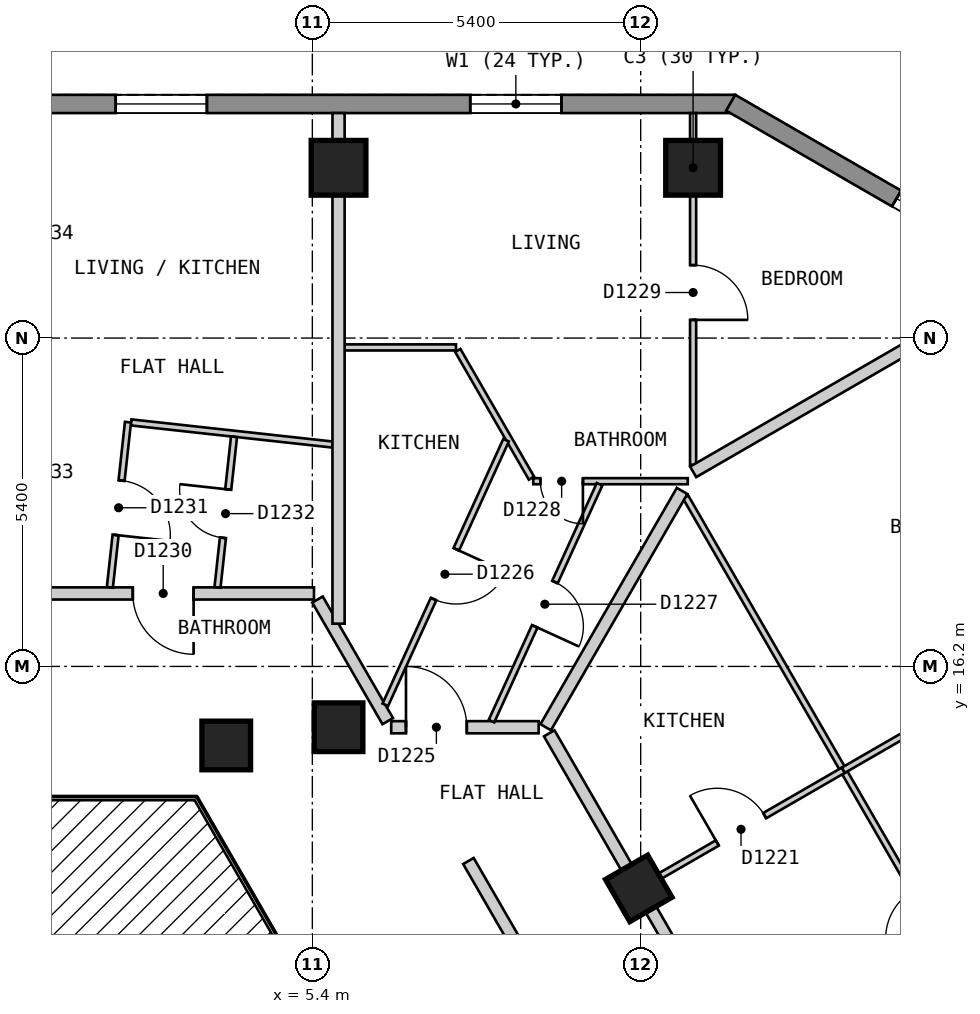
"""IFC4 building model, lengths in metres.
Left out: names, types, materials, properties, quantities, classifications, styles, units other than length and angle.
Written with IfcOpenShell. Run it as: python <this file> out.ifc"""

import sys

from ifc_helpers import new_model, si_unit, direction, frame, frame_2d, origin, origin_2d, place, context, subcontext, project, spatial, polyline, rectangle, outline, extrude, element, fill, save


model = new_model("IFC4")
c1 = context("Model", 3, precision=1e-05, world=origin(), true_north=direction((0.0, 1.0)))
c2 = subcontext(c1, "Body", "Model", "MODEL_VIEW")
j1 = project(units=[si_unit("LENGTHUNIT", "METRE"), si_unit("PLANEANGLEUNIT", "RADIAN")], contexts=[c1])
p1 = place(None, origin())
s1 = spatial("IfcSite", under=j1, at=p1, CompositionType="ELEMENT")
p2 = place(p1, origin())
s2 = spatial("IfcBuilding", under=s1, at=p2, CompositionType="ELEMENT")
p3 = place(p2, frame((0.0, 0.0, 117.6)))
s3 = spatial("IfcBuildingStorey", under=s2, at=p3, CompositionType="ELEMENT", Elevation=117.6)
for number, where, z_axis, x_axis in (
    (1, (11.662, 24.4, 0.0), (0.0, 0.0, 1.0), (-1.0, 0.0, 0.0)),
    (2, (5.831, 24.4, 0.0), (0.0, 0.0, 1.0), (-1.0, 0.0, 0.0)),
):
    element("IfcColumn", number, at=place(p3, frame(where, z_axis=z_axis, x_axis=x_axis)), inside=s3, PredefinedType="COLUMN", context=c2, shape_type="SweptSolid", body=[
        extrude(rectangle(XDim=0.9, YDim=0.9, at=origin_2d()), origin(), (0.0, 0.0, 1.0), 3.0),
    ])
for number, where, z_axis, x_axis in (
    (3, (10.768, 12.55, 0.0), (0.0, 0.0, 1.0), (-0.5, 0.866, 0.0)),
    (4, (5.831, 15.2, 0.0), (0.0, 0.0, 1.0), (-1.0, 0.0, 0.0)),
    (5, (3.984, 14.9, 0.0), (0.0, 0.0, 1.0), (1.0, 0.0, 0.0)),
):
    element("IfcColumn", number, at=place(p3, frame(where, z_axis=z_axis, x_axis=x_axis)), inside=s3, PredefinedType="COLUMN", context=c2, shape_type="SweptSolid", body=[
        extrude(rectangle(XDim=0.8, YDim=0.8, at=origin_2d()), origin(), (0.0, 0.0, 1.0), 3.0),
    ])
p4 = place(p3, frame((12.355, 25.45, 0.0), z_axis=(0.0, 0.0, 1.0), x_axis=(-1.0, 0.0, 0.0)))
e6 = element("IfcWall", 6, at=p4, inside=s3, PredefinedType="SOLIDWALL", context=c2, shape_type="SweptSolid", body=[
    extrude(outline(polyline([(0.0, -0.15), (24.71, -0.15), (24.63, 0.15), (0.08, 0.15), (0.0, -0.15)])), origin(), (0.0, 0.0, 1.0), 2.7),
])
p5 = place(p4, frame((2.858, 0.0, 0.15)))
e7 = element("IfcOpeningElement", 7, at=p5, cuts=e6, PredefinedType="OPENING", context=c2, shape_type="SweptSolid", body=[
    extrude(rectangle(XDim=1.5, YDim=2.1, at=frame_2d((0.75, 1.05))), frame((0.0, 0.16, 0.0), z_axis=(0.0, -1.0, 0.0), x_axis=(1.0, 0.0, 0.0)), (0.0, 0.0, 1.0), 0.32),
])
p6 = place(p4, frame((8.689, 0.0, 0.15)))
e8 = element("IfcOpeningElement", 8, at=p6, cuts=e6, PredefinedType="OPENING", context=c2, shape_type="SweptSolid", body=[
    extrude(rectangle(XDim=1.5, YDim=2.1, at=frame_2d((0.75, 1.05))), frame((0.0, 0.16, 0.0), z_axis=(0.0, -1.0, 0.0), x_axis=(1.0, 0.0, 0.0)), (0.0, 0.0, 1.0), 0.32),
])
p7 = place(p4, frame((14.521, 0.0, 0.15)))
e9 = element("IfcOpeningElement", 9, at=p7, cuts=e6, PredefinedType="OPENING", context=c2, shape_type="SweptSolid", body=[
    extrude(rectangle(XDim=1.5, YDim=2.1, at=frame_2d((0.75, 1.05))), frame((0.0, 0.16, 0.0), z_axis=(0.0, -1.0, 0.0), x_axis=(1.0, 0.0, 0.0)), (0.0, 0.0, 1.0), 0.32),
])
p8 = place(p4, frame((20.352, 0.0, 0.15)))
e10 = element("IfcOpeningElement", 10, at=p8, cuts=e6, PredefinedType="OPENING", context=c2, shape_type="SweptSolid", body=[
    extrude(rectangle(XDim=1.5, YDim=2.1, at=frame_2d((0.75, 1.05))), frame((0.0, 0.16, 0.0), z_axis=(0.0, -1.0, 0.0), x_axis=(1.0, 0.0, 0.0)), (0.0, 0.0, 1.0), 0.32),
])
p9 = place(p3, frame((16.61, 22.97, 0.0), z_axis=(0.0, 0.0, 1.0), x_axis=(-0.866022959057, 0.500004234368, 0.0)))
e11 = element("IfcWall", 11, at=p9, inside=s3, PredefinedType="SOLIDWALL", context=c2, shape_type="SweptSolid", body=[
    extrude(outline(polyline([(0.0, -0.15), (5.0, -0.15), (4.92, 0.15), (0.08, 0.15), (0.0, -0.15)])), origin(), (0.0, 0.0, 1.0), 2.7),
])
p10 = place(p9, frame((0.65, 0.0, 0.15)))
e12 = element("IfcOpeningElement", 12, at=p10, cuts=e11, PredefinedType="OPENING", context=c2, shape_type="SweptSolid", body=[
    extrude(rectangle(XDim=1.2, YDim=2.1, at=frame_2d((0.6, 1.05))), frame((0.0, 0.16, 0.0), z_axis=(0.0, -1.0, 0.0), x_axis=(1.0, 0.0, 0.0)), (0.0, 0.0, 1.0), 0.32),
])
p11 = place(p3, frame((5.485, 17.3, 0.0), z_axis=(0.0, 0.0, 1.0), x_axis=(0.500027479704, -0.866009537788, 0.0)))
e13 = element("IfcWall", 13, at=p11, inside=s3, PredefinedType="PARTITIONING", context=c2, shape_type="SweptSolid", body=[
    extrude(rectangle(XDim=2.309, YDim=0.2, at=frame_2d((1.155, 0.0))), origin(), (0.0, 0.0, 1.0), 2.7),
])
p12 = place(p3, frame((7.967, 13.0, 0.0), z_axis=(0.0, 0.0, 1.0), x_axis=(0.50003774998, -0.866003607726, 0.0)))
e14 = element("IfcWall", 14, at=p12, inside=s3, PredefinedType="PARTITIONING", context=c2, shape_type="SweptSolid", body=[
    extrude(rectangle(XDim=14.433, YDim=0.2, at=frame_2d((7.217, 0.0))), origin(), (0.0, 0.0, 1.0), 2.7),
])
p13 = place(p12, frame((6.824, 0.0, 0.0)))
e15 = element("IfcOpeningElement", 15, at=p13, cuts=e14, PredefinedType="OPENING", context=c2, shape_type="SweptSolid", body=[
    extrude(rectangle(XDim=0.9, YDim=2.1, at=frame_2d((0.45, 1.05))), frame((0.0, 0.11, 0.0), z_axis=(0.0, -1.0, 0.0), x_axis=(1.0, 0.0, 0.0)), (0.0, 0.0, 1.0), 0.22),
])
p14 = place(p3, frame((9.296, 15.1, 0.0), z_axis=(0.0, 0.0, 1.0), x_axis=(0.499974024244, -0.866040400375, 0.0)))
e16 = element("IfcWall", 16, at=p14, inside=s3, PredefinedType="PARTITIONING", context=c2, shape_type="SweptSolid", body=[
    extrude(rectangle(XDim=16.857, YDim=0.2, at=frame_2d((8.429, 0.0))), origin(), (0.0, 0.0, 1.0), 2.7),
])
p15 = place(p14, frame((5.187, 0.0, 0.0)))
e17 = element("IfcOpeningElement", 17, at=p15, cuts=e16, PredefinedType="OPENING", context=c2, shape_type="SweptSolid", body=[
    extrude(rectangle(XDim=1.0, YDim=2.1, at=frame_2d((0.5, 1.05))), frame((0.0, 0.11, 0.0), z_axis=(0.0, -1.0, 0.0), x_axis=(1.0, 0.0, 0.0)), (0.0, 0.0, 1.0), 0.22),
])
p16 = place(p3, frame((6.697, 15.2, 0.0), z_axis=(0.0, 0.0, 1.0), x_axis=(1.0, 0.0, 0.0)))
e18 = element("IfcWall", 18, at=p16, inside=s3, PredefinedType="PARTITIONING", context=c2, shape_type="SweptSolid", body=[
    extrude(rectangle(XDim=2.425, YDim=0.2, at=frame_2d((1.212, 0.0))), origin(), (0.0, 0.0, 1.0), 2.7),
])
p17 = place(p16, frame((0.243, 0.0, 0.0)))
e19 = element("IfcOpeningElement", 19, at=p17, cuts=e18, PredefinedType="OPENING", context=c2, shape_type="SweptSolid", body=[
    extrude(rectangle(XDim=1.0, YDim=2.1, at=frame_2d((0.5, 1.05))), frame((0.0, 0.11, 0.0), z_axis=(0.0, -1.0, 0.0), x_axis=(1.0, 0.0, 0.0)), (0.0, 0.0, 1.0), 0.22),
])
p18 = place(p3, frame((-5.311, 17.4, 0.0), z_axis=(0.0, 0.0, 1.0), x_axis=(1.0, 0.0, 0.0)))
e20 = element("IfcWall", 20, at=p18, inside=s3, PredefinedType="PARTITIONING", context=c2, shape_type="SweptSolid", body=[
    extrude(rectangle(XDim=10.738, YDim=0.2, at=frame_2d((5.369, 0.0))), origin(), (0.0, 0.0, 1.0), 2.7),
])
p19 = place(p18, frame((7.758, 0.0, 0.0)))
e21 = element("IfcOpeningElement", 21, at=p19, cuts=e20, PredefinedType="OPENING", context=c2, shape_type="SweptSolid", body=[
    extrude(rectangle(XDim=1.0, YDim=2.1, at=frame_2d((0.5, 1.05))), frame((0.0, 0.11, 0.0), z_axis=(0.0, -1.0, 0.0), x_axis=(1.0, 0.0, 0.0)), (0.0, 0.0, 1.0), 0.22),
])
p20 = place(p3, frame((7.792, 21.396, 0.0), z_axis=(0.0, 0.0, 1.0), x_axis=(0.499821239653, -0.866128586522, 0.0)))
e22 = element("IfcWall", 22, at=p20, inside=s3, PredefinedType="PARTITIONING", context=c2, shape_type="SweptSolid", body=[
    extrude(rectangle(XDim=2.425, YDim=0.1, at=frame_2d((1.212, 0.0))), origin(), (0.0, 0.0, 1.0), 2.7),
])
p21 = place(p3, frame((11.539, 18.986, 0.0), z_axis=(0.0, 0.0, 1.0), x_axis=(0.500019453803, -0.866014171835, 0.0)))
e23 = element("IfcWall", 23, at=p21, inside=s3, PredefinedType="PARTITIONING", context=c2, shape_type="SweptSolid", body=[
    extrude(rectangle(XDim=16.057, YDim=0.1, at=frame_2d((8.029, 0.0))), origin(), (0.0, 0.0, 1.0), 2.7),
])
p22 = place(p21, frame((7.48, 0.0, 0.0)))
e24 = element("IfcOpeningElement", 24, at=p22, cuts=e23, PredefinedType="OPENING", context=c2, shape_type="SweptSolid", body=[
    extrude(rectangle(XDim=0.9, YDim=2.1, at=frame_2d((0.45, 1.05))), frame((0.0, 0.06, 0.0), z_axis=(0.0, -1.0, 0.0), x_axis=(1.0, 0.0, 0.0)), (0.0, 0.0, 1.0), 0.12),
])
p23 = place(p3, frame((2.419, 20.213, 0.0), z_axis=(0.0, 0.0, 1.0), x_axis=(0.994022340378, -0.109176860325, 0.0)))
e25 = element("IfcWall", 25, at=p23, inside=s3, PredefinedType="PARTITIONING", context=c2, shape_type="SweptSolid", body=[
    extrude(rectangle(XDim=3.332, YDim=0.1, at=frame_2d((1.666, 0.0))), origin(), (0.0, 0.0, 1.0), 2.7),
])
p24 = place(p3, frame((9.033, 19.246, 0.0), z_axis=(0.0, 0.0, 1.0), x_axis=(1.0, 0.0, 0.0)))
e26 = element("IfcWall", 26, at=p24, inside=s3, PredefinedType="PARTITIONING", context=c2, shape_type="SweptSolid", body=[
    extrude(rectangle(XDim=2.541, YDim=0.1, at=frame_2d((1.271, 0.0))), origin(), (0.0, 0.0, 1.0), 2.7),
])
p25 = place(p24, frame((0.117, 0.0, 0.0)))
e27 = element("IfcOpeningElement", 27, at=p25, cuts=e26, PredefinedType="OPENING", context=c2, shape_type="SweptSolid", body=[
    extrude(rectangle(XDim=0.7, YDim=2.1, at=frame_2d((0.35, 1.05))), frame((0.0, 0.06, 0.0), z_axis=(0.0, -1.0, 0.0), x_axis=(1.0, 0.0, 0.0)), (0.0, 0.0, 1.0), 0.12),
])
p26 = place(p3, frame((5.931, 21.446, 0.0), z_axis=(0.0, 0.0, 1.0), x_axis=(1.0, 0.0, 0.0)))
e28 = element("IfcWall", 28, at=p26, inside=s3, PredefinedType="PARTITIONING", context=c2, shape_type="SweptSolid", body=[
    extrude(rectangle(XDim=1.832, YDim=0.1, at=frame_2d((0.916, 0.0))), origin(), (0.0, 0.0, 1.0), 2.7),
])
p27 = place(p3, frame((8.346, 15.3, 0.0), z_axis=(0.0, 0.0, 1.0), x_axis=(0.415189790387, 0.909734817383, 0.0)))
e29 = element("IfcWall", 29, at=p27, inside=s3, PredefinedType="PARTITIONING", context=c2, shape_type="SweptSolid", body=[
    extrude(rectangle(XDim=4.282, YDim=0.1, at=frame_2d((2.141, 0.0))), origin(), (0.0, 0.0, 1.0), 2.7),
])
p28 = place(p27, frame((1.714, 0.0, 0.0)))
e30 = element("IfcOpeningElement", 30, at=p28, cuts=e29, PredefinedType="OPENING", context=c2, shape_type="SweptSolid", body=[
    extrude(rectangle(XDim=0.8, YDim=2.1, at=frame_2d((0.4, 1.05))), frame((0.0, 0.06, 0.0), z_axis=(0.0, -1.0, 0.0), x_axis=(1.0, 0.0, 0.0)), (0.0, 0.0, 1.0), 0.12),
])
p29 = place(p3, frame((6.6, 15.569, 0.0), z_axis=(0.0, 0.0, 1.0), x_axis=(0.415221636251, 0.909720282718, 0.0)))
e31 = element("IfcWall", 31, at=p29, inside=s3, PredefinedType="PARTITIONING", context=c2, shape_type="SweptSolid", body=[
    extrude(rectangle(XDim=4.783, YDim=0.1, at=frame_2d((2.391, 0.0))), origin(), (0.0, 0.0, 1.0), 2.7),
])
p30 = place(p29, frame((1.911, 0.0, 0.0)))
e32 = element("IfcOpeningElement", 32, at=p30, cuts=e31, PredefinedType="OPENING", context=c2, shape_type="SweptSolid", body=[
    extrude(rectangle(XDim=0.9, YDim=2.1, at=frame_2d((0.45, 1.05))), frame((0.0, 0.06, 0.0), z_axis=(0.0, -1.0, 0.0), x_axis=(1.0, 0.0, 0.0)), (0.0, 0.0, 1.0), 0.12),
])
p31 = place(p3, frame((2.07, 17.5, 0.0), z_axis=(0.0, 0.0, 1.0), x_axis=(0.108970694085, 0.994044962681, 0.0)))
e33 = element("IfcWall", 33, at=p31, inside=s3, PredefinedType="PARTITIONING", context=c2, shape_type="SweptSolid", body=[
    extrude(rectangle(XDim=2.733, YDim=0.1, at=frame_2d((1.367, 0.0))), origin(), (0.0, 0.0, 1.0), 2.7),
])
p32 = place(p31, frame((0.867, 0.0, 0.0)))
e34 = element("IfcOpeningElement", 34, at=p32, cuts=e33, PredefinedType="OPENING", context=c2, shape_type="SweptSolid", body=[
    extrude(rectangle(XDim=0.9, YDim=2.1, at=frame_2d((0.45, 1.05))), frame((0.0, 0.06, 0.0), z_axis=(0.0, -1.0, 0.0), x_axis=(1.0, 0.0, 0.0)), (0.0, 0.0, 1.0), 0.12),
])
p33 = place(p3, frame((3.84, 17.5, 0.0), z_axis=(0.0, 0.0, 1.0), x_axis=(0.109141067014, 0.994026271027, 0.0)))
e35 = element("IfcWall", 35, at=p33, inside=s3, PredefinedType="PARTITIONING", context=c2, shape_type="SweptSolid", body=[
    extrude(rectangle(XDim=2.492, YDim=0.1, at=frame_2d((1.246, 0.0))), origin(), (0.0, 0.0, 1.0), 2.7),
])
p34 = place(p33, frame((0.82, 0.0, 0.0)))
e36 = element("IfcOpeningElement", 36, at=p34, cuts=e35, PredefinedType="OPENING", context=c2, shape_type="SweptSolid", body=[
    extrude(rectangle(XDim=0.8, YDim=2.1, at=frame_2d((0.4, 1.05))), frame((0.0, 0.06, 0.0), z_axis=(0.0, -1.0, 0.0), x_axis=(1.0, 0.0, 0.0)), (0.0, 0.0, 1.0), 0.12),
])
p35 = place(p3, frame((11.662, 19.514, 0.0), z_axis=(0.0, 0.0, 1.0), x_axis=(0.0, 1.0, 0.0)))
e37 = element("IfcWall", 37, at=p35, inside=s3, PredefinedType="PARTITIONING", context=c2, shape_type="SweptSolid", body=[
    extrude(rectangle(XDim=5.786, YDim=0.1, at=frame_2d((2.893, 0.0))), origin(), (0.0, 0.0, 1.0), 2.7),
])
p36 = place(p35, frame((2.385, 0.0, 0.0)))
e38 = element("IfcOpeningElement", 38, at=p36, cuts=e37, PredefinedType="OPENING", context=c2, shape_type="SweptSolid", body=[
    extrude(rectangle(XDim=0.9, YDim=2.1, at=frame_2d((0.45, 1.05))), frame((0.0, 0.06, 0.0), z_axis=(0.0, -1.0, 0.0), x_axis=(1.0, 0.0, 0.0)), (0.0, 0.0, 1.0), 0.12),
])
p37 = place(p3, frame((10.854, 12.6, 0.0), z_axis=(0.0, 0.0, 1.0), x_axis=(0.8660642533, 0.499932704626, 0.0)))
e39 = element("IfcWall", 39, at=p37, inside=s3, PredefinedType="PARTITIONING", context=c2, shape_type="SweptSolid", body=[
    extrude(rectangle(XDim=3.786, YDim=0.1, at=frame_2d((1.893, 0.0))), origin(), (0.0, 0.0, 1.0), 2.7),
])
p38 = place(p37, frame((1.393, 0.0, 0.0)))
e40 = element("IfcOpeningElement", 40, at=p38, cuts=e39, PredefinedType="OPENING", context=c2, shape_type="SweptSolid", body=[
    extrude(rectangle(XDim=0.9, YDim=2.1, at=frame_2d((0.45, 1.05))), frame((0.0, 0.06, 0.0), z_axis=(0.0, -1.0, 0.0), x_axis=(1.0, 0.0, 0.0)), (0.0, 0.0, 1.0), 0.12),
])
p39 = place(p3, frame((9.238, 15.2, 0.0), z_axis=(0.0, 0.0, 1.0), x_axis=(0.499890453443, 0.866088641281, 0.0)))
e41 = element("IfcWall", 41, at=p39, inside=s3, PredefinedType="PARTITIONING", context=c2, shape_type="SweptSolid", body=[
    extrude(rectangle(XDim=4.487, YDim=0.2, at=frame_2d((2.243, 0.0))), origin(), (0.0, 0.0, 1.0), 2.7),
])
p40 = place(p3, frame((5.831, 16.903, 0.0), z_axis=(0.0, 0.0, 1.0), x_axis=(0.0, 1.0, 0.0)))
e42 = element("IfcWall", 42, at=p40, inside=s3, PredefinedType="PARTITIONING", context=c2, shape_type="SweptSolid", body=[
    extrude(rectangle(XDim=8.397, YDim=0.2, at=frame_2d((4.198, 0.0))), origin(), (0.0, 0.0, 1.0), 2.7),
])
p41 = place(p3, frame((11.663, 19.4, 0.0), z_axis=(0.0, 0.0, 1.0), x_axis=(0.865941558533, 0.500145196124, 0.0)))
e43 = element("IfcWall", 43, at=p41, inside=s3, PredefinedType="PARTITIONING", context=c2, shape_type="SweptSolid", body=[
    extrude(rectangle(XDim=5.899, YDim=0.2, at=frame_2d((2.949, 0.0))), origin(), (0.0, 0.0, 1.0), 2.7),
])
p42 = place(p3, frame((14.133, 14.493, 0.0), z_axis=(0.0, 0.0, 1.0), x_axis=(0.866056028236, 0.499946953142, 0.0)))
e44 = element("IfcWall", 44, at=p42, inside=s3, PredefinedType="PARTITIONING", context=c2, shape_type="SweptSolid", body=[
    extrude(rectangle(XDim=6.213, YDim=0.1, at=frame_2d((3.106, 0.0))), origin(), (0.0, 0.0, 1.0), 2.7),
])
p43 = place(p42, frame((2.657, 0.0, 0.0)))
e45 = element("IfcOpeningElement", 45, at=p43, cuts=e44, PredefinedType="OPENING", context=c2, shape_type="SweptSolid", body=[
    extrude(rectangle(XDim=0.9, YDim=2.1, at=frame_2d((0.45, 1.05))), frame((0.0, 0.06, 0.0), z_axis=(0.0, -1.0, 0.0), x_axis=(1.0, 0.0, 0.0)), (0.0, 0.0, 1.0), 0.12),
])
p44 = place(p5, origin())
e46 = element("IfcWindow", 46, at=p44, inside=s3, PartitioningType="SINGLE_PANEL", PredefinedType="WINDOW", context=c2, shape_type="SweptSolid", body=[
    extrude(rectangle(XDim=1.5, YDim=2.1, at=frame_2d((0.75, 1.05))), frame((0.0, 0.03, 0.0), z_axis=(0.0, -1.0, 0.0), x_axis=(1.0, 0.0, 0.0)), (0.0, 0.0, 1.0), 0.06),
])
fill(e7, e46)
p45 = place(p6, origin())
e47 = element("IfcWindow", 47, at=p45, inside=s3, PartitioningType="SINGLE_PANEL", PredefinedType="WINDOW", context=c2, shape_type="SweptSolid", body=[
    extrude(rectangle(XDim=1.5, YDim=2.1, at=frame_2d((0.75, 1.05))), frame((0.0, 0.03, 0.0), z_axis=(0.0, -1.0, 0.0), x_axis=(1.0, 0.0, 0.0)), (0.0, 0.0, 1.0), 0.06),
])
fill(e8, e47)
p46 = place(p10, origin())
e48 = element("IfcWindow", 48, at=p46, inside=s3, PartitioningType="SINGLE_PANEL", PredefinedType="WINDOW", context=c2, shape_type="SweptSolid", body=[
    extrude(rectangle(XDim=1.2, YDim=2.1, at=frame_2d((0.6, 1.05))), frame((0.0, 0.03, 0.0), z_axis=(0.0, -1.0, 0.0), x_axis=(1.0, 0.0, 0.0)), (0.0, 0.0, 1.0), 0.06),
])
fill(e12, e48)
p47 = place(p38, origin())
e49 = element("IfcDoor", 49, at=p47, inside=s3, OperationType="SINGLE_SWING_LEFT", PredefinedType="DOOR", context=c2, shape_type="SweptSolid", body=[
    extrude(rectangle(XDim=0.9, YDim=2.1, at=frame_2d((0.45, 1.05))), frame((0.0, 0.025, 0.0), z_axis=(0.0, -1.0, 0.0), x_axis=(1.0, 0.0, 0.0)), (0.0, 0.0, 1.0), 0.05),
])
fill(e40, e49)
p48 = place(p17, origin())
e50 = element("IfcDoor", 50, at=p48, inside=s3, OperationType="SINGLE_SWING_LEFT", PredefinedType="DOOR", context=c2, shape_type="SweptSolid", body=[
    extrude(rectangle(XDim=1.0, YDim=2.1, at=frame_2d((0.5, 1.05))), frame((0.0, 0.025, 0.0), z_axis=(0.0, -1.0, 0.0), x_axis=(1.0, 0.0, 0.0)), (0.0, 0.0, 1.0), 0.05),
])
fill(e19, e50)
p49 = place(p30, origin())
e51 = element("IfcDoor", 51, at=p49, inside=s3, OperationType="SINGLE_SWING_RIGHT", PredefinedType="DOOR", context=c2, shape_type="SweptSolid", body=[
    extrude(rectangle(XDim=0.9, YDim=2.1, at=frame_2d((0.45, 1.05))), frame((0.0, 0.025, 0.0), z_axis=(0.0, -1.0, 0.0), x_axis=(1.0, 0.0, 0.0)), (0.0, 0.0, 1.0), 0.05),
])
fill(e32, e51)
p50 = place(p28, origin())
e52 = element("IfcDoor", 52, at=p50, inside=s3, OperationType="SINGLE_SWING_LEFT", PredefinedType="DOOR", context=c2, shape_type="SweptSolid", body=[
    extrude(rectangle(XDim=0.8, YDim=2.1, at=frame_2d((0.4, 1.05))), frame((0.0, 0.025, 0.0), z_axis=(0.0, -1.0, 0.0), x_axis=(1.0, 0.0, 0.0)), (0.0, 0.0, 1.0), 0.05),
])
fill(e30, e52)
p51 = place(p25, origin())
e53 = element("IfcDoor", 53, at=p51, inside=s3, OperationType="SINGLE_SWING_RIGHT", PredefinedType="DOOR", context=c2, shape_type="SweptSolid", body=[
    extrude(rectangle(XDim=0.7, YDim=2.1, at=frame_2d((0.35, 1.05))), frame((0.0, 0.025, 0.0), z_axis=(0.0, -1.0, 0.0), x_axis=(1.0, 0.0, 0.0)), (0.0, 0.0, 1.0), 0.05),
])
fill(e27, e53)
p52 = place(p36, origin())
e54 = element("IfcDoor", 54, at=p52, inside=s3, OperationType="SINGLE_SWING_LEFT", PredefinedType="DOOR", context=c2, shape_type="SweptSolid", body=[
    extrude(rectangle(XDim=0.9, YDim=2.1, at=frame_2d((0.45, 1.05))), frame((0.0, 0.025, 0.0), z_axis=(0.0, -1.0, 0.0), x_axis=(1.0, 0.0, 0.0)), (0.0, 0.0, 1.0), 0.05),
])
fill(e38, e54)
p53 = place(p19, origin())
e55 = element("IfcDoor", 55, at=p53, inside=s3, OperationType="SINGLE_SWING_RIGHT", PredefinedType="DOOR", context=c2, shape_type="SweptSolid", body=[
    extrude(rectangle(XDim=1.0, YDim=2.1, at=frame_2d((0.5, 1.05))), frame((0.0, 0.025, 0.0), z_axis=(0.0, -1.0, 0.0), x_axis=(1.0, 0.0, 0.0)), (0.0, 0.0, 1.0), 0.05),
])
fill(e21, e55)
p54 = place(p32, origin())
e56 = element("IfcDoor", 56, at=p54, inside=s3, OperationType="SINGLE_SWING_LEFT", PredefinedType="DOOR", context=c2, shape_type="SweptSolid", body=[
    extrude(rectangle(XDim=0.9, YDim=2.1, at=frame_2d((0.45, 1.05))), frame((0.0, 0.025, 0.0), z_axis=(0.0, -1.0, 0.0), x_axis=(1.0, 0.0, 0.0)), (0.0, 0.0, 1.0), 0.05),
])
fill(e34, e56)
p55 = place(p34, origin())
e57 = element("IfcDoor", 57, at=p55, inside=s3, OperationType="SINGLE_SWING_RIGHT", PredefinedType="DOOR", context=c2, shape_type="SweptSolid", body=[
    extrude(rectangle(XDim=0.8, YDim=2.1, at=frame_2d((0.4, 1.05))), frame((0.0, 0.025, 0.0), z_axis=(0.0, -1.0, 0.0), x_axis=(1.0, 0.0, 0.0)), (0.0, 0.0, 1.0), 0.05),
])
fill(e36, e57)
save(model, sys.argv[1])
